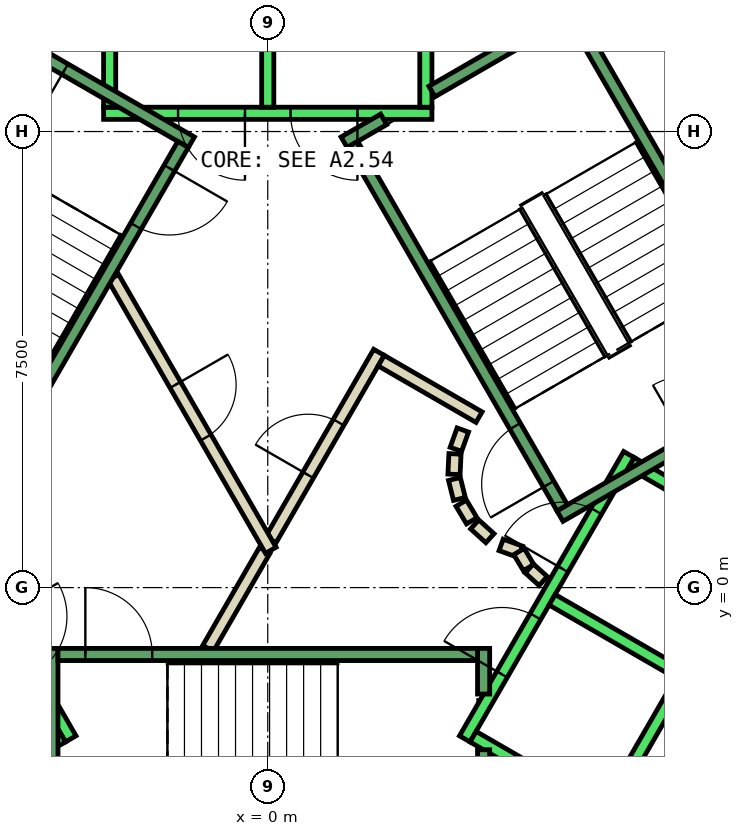
"""IFC4 building model, lengths in metres.
Left out: names, types, materials, properties, quantities, classifications, styles, units other than length and angle.
Written with IfcOpenShell. Run it as: python <this file> out.ifc"""

import sys

from ifc_helpers import new_model, si_unit, direction, frame, frame_2d, origin, place, context, subcontext, project, spatial, polyline, rectangle, outline, extrude, element, fill, save


model = new_model("IFC4")
c1 = context("Model", 3, precision=1e-05, world=origin(), true_north=direction((0.0, 1.0)))
c2 = subcontext(c1, "Body", "Model", "MODEL_VIEW")
j1 = project(units=[si_unit("LENGTHUNIT", "METRE"), si_unit("PLANEANGLEUNIT", "RADIAN")], contexts=[c1])
p1 = place(None, origin())
s1 = spatial("IfcSite", under=j1, at=p1, CompositionType="ELEMENT")
p2 = place(p1, origin())
s2 = spatial("IfcBuilding", under=s1, at=p2, CompositionType="ELEMENT")
p3 = place(p2, frame((0.0, 0.0, 259.4)))
s3 = spatial("IfcBuildingStorey", under=s2, at=p3, CompositionType="ELEMENT", Elevation=259.4)
p4 = place(p3, frame((0.0, 0.0, -0.34)))
e1 = element("IfcWall", 1, at=p4, inside=s3, PredefinedType="SHEAR", context=c2, shape_type="SweptSolid", body=[
    extrude(outline(polyline([(6.786, 10.747), (6.266, 10.447), (10.854, 2.5), (11.547, 2.5), (6.786, 10.747)])), origin(), (0.0, 0.0, 1.0), 3.6),
])
p5 = place(p3, frame((0.0, 0.0, -0.34)))
e2 = element("IfcWall", 2, at=p5, inside=s3, PredefinedType="SHEAR", context=c2, shape_type="SweptSolid", body=[
    extrude(outline(polyline([(5.774, -7.5), (11.547, 2.5), (10.854, 2.5), (5.427, -6.9), (5.774, -7.5)])), origin(), (0.0, 0.0, 1.0), 3.6),
])
p6 = place(p3, frame((-0.982, -1.0, 0.0), z_axis=(0.0, 0.0, 1.0), x_axis=(0.50024047865, 0.865886518847, 0.0)))
e3 = element("IfcWall", 3, at=p6, inside=s3, PredefinedType="PARTITIONING", context=c2, shape_type="SweptSolid", body=[
    extrude(rectangle(XDim=1.863, YDim=0.2, at=frame_2d((0.931, 0.0))), origin(), (0.0, 0.0, 1.0), 3.26),
])
p7 = place(p3, frame((0.05, 0.787, 0.0), z_axis=(0.0, 0.0, 1.0), x_axis=(0.499954076797, 0.866051915934, 0.0)))
e4 = element("IfcWall", 4, at=p7, inside=s3, PredefinedType="PARTITIONING", context=c2, shape_type="SweptSolid", body=[
    extrude(rectangle(XDim=3.558, YDim=0.2, at=frame_2d((1.779, 0.0))), origin(), (0.0, 0.0, 1.0), 3.26),
])
p8 = place(p7, frame((1.229, 0.0, 0.0)))
e5 = element("IfcOpeningElement", 5, at=p8, cuts=e4, PredefinedType="OPENING", context=c2, shape_type="SweptSolid", body=[
    extrude(rectangle(XDim=1.0, YDim=2.1, at=frame_2d((0.5, 1.05))), frame((0.0, 0.11, 0.0), z_axis=(0.0, -1.0, 0.0), x_axis=(1.0, 0.0, 0.0)), (0.0, 0.0, 1.0), 0.22),
])
p9 = place(p3, frame((1.866, 3.732, 0.0), z_axis=(0.0, 0.0, 1.0), x_axis=(0.866043361281, -0.499968895414, 0.0)))
e6 = element("IfcWall", 6, at=p9, inside=s3, PredefinedType="PARTITIONING", context=c2, shape_type="SweptSolid", body=[
    extrude(rectangle(XDim=1.858, YDim=0.2, at=frame_2d((0.929, 0.0))), origin(), (0.0, 0.0, 1.0), 3.26),
])
p10 = place(p3, frame((3.208, 2.592, 0.0), z_axis=(0.0, 0.0, 1.0), x_axis=(-0.337388820924, -0.941365382578, 0.0)))
e7 = element("IfcWall", 7, at=p10, inside=s3, PredefinedType="PARTITIONING", context=c2, shape_type="SweptSolid", body=[
    extrude(rectangle(XDim=0.338, YDim=0.2, at=frame_2d((0.169, 0.0))), origin(), (0.0, 0.0, 1.0), 3.26),
])
p11 = place(p3, frame((3.079, 2.199, 0.0), z_axis=(0.0, 0.0, 1.0), x_axis=(-0.047771483479, -0.998858290933, 0.0)))
e8 = element("IfcWall", 8, at=p11, inside=s3, PredefinedType="PARTITIONING", context=c2, shape_type="SweptSolid", body=[
    extrude(rectangle(XDim=0.337, YDim=0.2, at=frame_2d((0.169, 0.0))), origin(), (0.0, 0.0, 1.0), 3.26),
])
p12 = place(p3, frame((3.07, 1.786, 0.0), z_axis=(0.0, 0.0, 1.0), x_axis=(0.242705583207, -0.970099994784, 0.0)))
e9 = element("IfcWall", 9, at=p12, inside=s3, PredefinedType="PARTITIONING", context=c2, shape_type="SweptSolid", body=[
    extrude(rectangle(XDim=0.338, YDim=0.2, at=frame_2d((0.169, 0.0))), origin(), (0.0, 0.0, 1.0), 3.26),
])
for number, where, z_axis, x_axis in (
    (10, (3.182, 1.388, 0.0), (0.0, 0.0, 1.0), (0.512, -0.859, 0.0)),
    (11, (3.404, 1.039, 0.0), (0.0, 0.0, 1.0), (0.74, -0.672, 0.0)),
):
    element("IfcWall", number, at=place(p3, frame(where, z_axis=z_axis, x_axis=x_axis)), inside=s3, PredefinedType="PARTITIONING", context=c2, shape_type="SweptSolid", body=[
        extrude(rectangle(XDim=0.338, YDim=0.2, at=frame_2d((0.169, 0.0))), origin(), (0.0, 0.0, 1.0), 3.26),
    ])
p13 = place(p3, frame((3.838, 0.702, 0.0), z_axis=(0.0, 0.0, 1.0), x_axis=(0.941035081519, -0.338308993895, 0.0)))
e12 = element("IfcWall", 12, at=p13, inside=s3, PredefinedType="PARTITIONING", context=c2, shape_type="SweptSolid", body=[
    extrude(rectangle(XDim=0.337, YDim=0.2, at=frame_2d((0.168, 0.0))), origin(), (0.0, 0.0, 1.0), 3.26),
])
p14 = place(p3, frame((4.132, 0.593, 0.0), z_axis=(0.0, 0.0, 1.0), x_axis=(0.513561617048, -0.858052717201, 0.0)))
e13 = element("IfcWall", 13, at=p14, inside=s3, PredefinedType="PARTITIONING", context=c2, shape_type="SweptSolid", body=[
    extrude(rectangle(XDim=0.308, YDim=0.2, at=frame_2d((0.154, 0.0))), origin(), (0.0, 0.0, 1.0), 3.26),
])
p15 = place(p3, frame((4.301, 0.315, 0.0), z_axis=(0.0, 0.0, 1.0), x_axis=(0.741798017506, -0.670623367639, 0.0)))
e14 = element("IfcWall", 14, at=p15, inside=s3, PredefinedType="PARTITIONING", context=c2, shape_type="SweptSolid", body=[
    extrude(rectangle(XDim=0.309, YDim=0.2, at=frame_2d((0.154, 0.0))), origin(), (0.0, 0.0, 1.0), 3.26),
])
p16 = place(p3, frame((-2.54, 5.1, 0.0), z_axis=(0.0, 0.0, 1.0), x_axis=(0.499925051871, -0.866068670783, 0.0)))
e15 = element("IfcWall", 15, at=p16, inside=s3, PredefinedType="PARTITIONING", context=c2, shape_type="SweptSolid", body=[
    extrude(rectangle(XDim=5.181, YDim=0.2, at=frame_2d((2.59, 0.0))), origin(), (0.0, 0.0, 1.0), 3.26),
])
p17 = place(p16, frame((2.04, 0.0, 0.0)))
e16 = element("IfcOpeningElement", 16, at=p17, cuts=e15, PredefinedType="OPENING", context=c2, shape_type="SweptSolid", body=[
    extrude(rectangle(XDim=1.0, YDim=2.1, at=frame_2d((0.5, 1.05))), frame((0.0, 0.11, 0.0), z_axis=(0.0, -1.0, 0.0), x_axis=(1.0, 0.0, 0.0)), (0.0, 0.0, 1.0), 0.22),
])
p18 = place(p3, frame((2.7, 7.8, 0.0), z_axis=(0.0, 0.0, 1.0), x_axis=(-1.0, 0.0, 0.0)))
e17 = element("IfcWall", 17, at=p18, inside=s3, PredefinedType="STANDARD", context=c2, shape_type="SweptSolid", body=[
    extrude(rectangle(XDim=5.4, YDim=0.2, at=frame_2d((2.7, 0.0))), origin(), (0.0, 0.0, 1.0), 3.26),
])
p19 = place(p18, frame((1.225, 0.0, 0.0)))
e18 = element("IfcOpeningElement", 18, at=p19, cuts=e17, PredefinedType="OPENING", context=c2, shape_type="SweptSolid", body=[
    extrude(rectangle(XDim=1.1, YDim=2.1, at=frame_2d((0.55, 1.05))), frame((0.0, 0.11, 0.0), z_axis=(0.0, -1.0, 0.0), x_axis=(1.0, 0.0, 0.0)), (0.0, 0.0, 1.0), 0.22),
])
p20 = place(p18, frame((3.075, 0.0, 0.0)))
e19 = element("IfcOpeningElement", 19, at=p20, cuts=e17, PredefinedType="OPENING", context=c2, shape_type="SweptSolid", body=[
    extrude(rectangle(XDim=1.1, YDim=2.1, at=frame_2d((0.55, 1.05))), frame((0.0, 0.11, 0.0), z_axis=(0.0, -1.0, 0.0), x_axis=(1.0, 0.0, 0.0)), (0.0, 0.0, 1.0), 0.22),
])
for number, where, z_axis, x_axis in (
    (20, (2.6, 7.9, 0.0), (0.0, 0.0, 1.0), (0.0, 1.0, 0.0)),
    (21, (0.0, 7.9, 0.0), (0.0, 0.0, 1.0), (0.0, 1.0, 0.0)),
    (22, (-2.6, 7.9, 0.0), (0.0, 0.0, 1.0), (0.0, 1.0, 0.0)),
):
    element("IfcWall", number, at=place(p3, frame(where, z_axis=z_axis, x_axis=x_axis)), inside=s3, PredefinedType="STANDARD", context=c2, shape_type="SweptSolid", body=[
        extrude(rectangle(XDim=2.4, YDim=0.2, at=frame_2d((1.2, 0.0))), origin(), (0.0, 0.0, 1.0), 3.26),
    ])
p21 = place(p3, frame((-5.94, 2.188, 0.0), z_axis=(0.0, 0.0, 1.0), x_axis=(0.500034260056, -0.866005622828, 0.0)))
e23 = element("IfcWall", 23, at=p21, inside=s3, PredefinedType="STANDARD", context=c2, shape_type="SweptSolid", body=[
    extrude(rectangle(XDim=5.399, YDim=0.2, at=frame_2d((2.7, 0.0))), origin(), (0.0, 0.0, 1.0), 3.26),
])
p22 = place(p21, frame((3.075, 0.0, 0.0)))
e24 = element("IfcOpeningElement", 24, at=p22, cuts=e23, PredefinedType="OPENING", context=c2, shape_type="SweptSolid", body=[
    extrude(rectangle(XDim=1.1, YDim=2.1, at=frame_2d((0.55, 1.05))), frame((0.0, 0.11, 0.0), z_axis=(0.0, -1.0, 0.0), x_axis=(1.0, 0.0, 0.0)), (0.0, 0.0, 1.0), 0.22),
])
p23 = place(p21, frame((1.225, 0.0, 0.0)))
e25 = element("IfcOpeningElement", 25, at=p23, cuts=e23, PredefinedType="OPENING", context=c2, shape_type="SweptSolid", body=[
    extrude(rectangle(XDim=1.1, YDim=2.1, at=frame_2d((0.55, 1.05))), frame((0.0, 0.11, 0.0), z_axis=(0.0, -1.0, 0.0), x_axis=(1.0, 0.0, 0.0)), (0.0, 0.0, 1.0), 0.22),
])
p24 = place(p3, frame((-3.377, -2.452, 0.0), z_axis=(0.0, 0.0, 1.0), x_axis=(-0.865955154139, -0.50012165622, 0.0)))
e26 = element("IfcWall", 26, at=p24, inside=s3, PredefinedType="STANDARD", context=c2, shape_type="SweptSolid", body=[
    extrude(rectangle(XDim=2.4, YDim=0.2, at=frame_2d((1.2, 0.0))), origin(), (0.0, 0.0, 1.0), 3.26),
])
p25 = place(p3, frame((3.24, -2.488, 0.0), z_axis=(0.0, 0.0, 1.0), x_axis=(0.500034260056, 0.866005622828, 0.0)))
e27 = element("IfcWall", 27, at=p25, inside=s3, PredefinedType="STANDARD", context=c2, shape_type="SweptSolid", body=[
    extrude(rectangle(XDim=5.399, YDim=0.2, at=frame_2d((2.7, 0.0))), origin(), (0.0, 0.0, 1.0), 3.26),
])
p26 = place(p25, frame((3.225, 0.0, 0.0)))
e28 = element("IfcOpeningElement", 28, at=p26, cuts=e27, PredefinedType="OPENING", context=c2, shape_type="SweptSolid", body=[
    extrude(rectangle(XDim=1.1, YDim=2.1, at=frame_2d((0.55, 1.05))), frame((0.0, 0.11, 0.0), z_axis=(0.0, -1.0, 0.0), x_axis=(1.0, 0.0, 0.0)), (0.0, 0.0, 1.0), 0.22),
])
p27 = place(p25, frame((1.225, 0.0, 0.0)))
e29 = element("IfcOpeningElement", 29, at=p27, cuts=e27, PredefinedType="OPENING", context=c2, shape_type="SweptSolid", body=[
    extrude(rectangle(XDim=1.1, YDim=2.1, at=frame_2d((0.55, 1.05))), frame((0.0, 0.11, 0.0), z_axis=(0.0, -1.0, 0.0), x_axis=(1.0, 0.0, 0.0)), (0.0, 0.0, 1.0), 0.22),
])
p28 = place(p3, frame((5.492, -3.788, 0.0), z_axis=(0.0, 0.0, 1.0), x_axis=(0.500034260056, 0.866005622828, 0.0)))
e30 = element("IfcWall", 30, at=p28, inside=s3, PredefinedType="STANDARD", context=c2, shape_type="SweptSolid", body=[
    extrude(rectangle(XDim=5.399, YDim=0.2, at=frame_2d((2.7, 0.0))), origin(), (0.0, 0.0, 1.0), 3.26),
])
p29 = place(p3, frame((3.377, -2.452, 0.0), z_axis=(0.0, 0.0, 1.0), x_axis=(0.865955154139, -0.50012165622, 0.0)))
e31 = element("IfcWall", 31, at=p29, inside=s3, PredefinedType="STANDARD", context=c2, shape_type="SweptSolid", body=[
    extrude(rectangle(XDim=2.4, YDim=0.2, at=frame_2d((1.2, 0.0))), origin(), (0.0, 0.0, 1.0), 3.26),
])
for number, where, z_axis, x_axis in (
    (32, (4.677, -0.2, 0.0), (0.0, 0.0, 1.0), (0.866, -0.5, 0.0)),
    (33, (5.977, 2.052, 0.0), (0.0, 0.0, 1.0), (0.866, -0.5, 0.0)),
):
    element("IfcWall", number, at=place(p3, frame(where, z_axis=z_axis, x_axis=x_axis)), inside=s3, PredefinedType="STANDARD", context=c2, shape_type="SweptSolid", body=[
        extrude(rectangle(XDim=2.399, YDim=0.2, at=frame_2d((1.2, 0.0))), origin(), (0.0, 0.0, 1.0), 3.26),
    ])
p30 = place(p3, frame((-3.55, -1.0, 0.0), z_axis=(0.0, 0.0, 1.0), x_axis=(0.0, -1.0, 0.0)))
e34 = element("IfcWall", 34, at=p30, inside=s3, PredefinedType="STANDARD", context=c2, shape_type="SweptSolid", body=[
    extrude(rectangle(XDim=4.4, YDim=0.2, at=frame_2d((2.2, 0.0))), origin(), (0.0, 0.0, 1.0), 3.26),
])
p31 = place(p30, frame((2.4, 0.0, 0.0)))
e35 = element("IfcOpeningElement", 35, at=p31, cuts=e34, PredefinedType="OPENING", context=c2, shape_type="SweptSolid", body=[
    extrude(rectangle(XDim=1.1, YDim=2.2, at=frame_2d((0.55, 1.1))), frame((0.0, 0.11, 0.0), z_axis=(0.0, -1.0, 0.0), x_axis=(1.0, 0.0, 0.0)), (0.0, 0.0, 1.0), 0.22),
])
p32 = place(p3, frame((3.55, -2.667, 0.0), z_axis=(0.0, 0.0, 1.0), x_axis=(0.0, -1.0, 0.0)))
e36 = element("IfcWall", 36, at=p32, inside=s3, PredefinedType="STANDARD", context=c2, shape_type="SweptSolid", body=[
    extrude(rectangle(XDim=2.733, YDim=0.2, at=frame_2d((1.366, 0.0))), origin(), (0.0, 0.0, 1.0), 3.26),
])
p33 = place(p3, frame((3.55, -1.0, 0.0), z_axis=(0.0, 0.0, 1.0), x_axis=(0.0, -1.0, 0.0)))
e37 = element("IfcWall", 37, at=p33, inside=s3, PredefinedType="STANDARD", context=c2, shape_type="SweptSolid", body=[
    extrude(rectangle(XDim=0.751, YDim=0.2, at=frame_2d((0.375, 0.0))), origin(), (0.0, 0.0, 1.0), 3.26),
])
p34 = place(p3, frame((-3.45, -1.1, 0.0), z_axis=(0.0, 0.0, 1.0), x_axis=(1.0, 0.0, 0.0)))
e38 = element("IfcWall", 38, at=p34, inside=s3, PredefinedType="STANDARD", context=c2, shape_type="SweptSolid", body=[
    extrude(rectangle(XDim=6.9, YDim=0.2, at=frame_2d((3.45, 0.0))), origin(), (0.0, 0.0, 1.0), 3.26),
])
p35 = place(p34, frame((0.45, 0.0, 0.0)))
e39 = element("IfcOpeningElement", 39, at=p35, cuts=e38, PredefinedType="OPENING", context=c2, shape_type="SweptSolid", body=[
    extrude(rectangle(XDim=1.1, YDim=2.2, at=frame_2d((0.55, 1.1))), frame((0.0, 0.11, 0.0), z_axis=(0.0, -1.0, 0.0), x_axis=(1.0, 0.0, 0.0)), (0.0, 0.0, 1.0), 0.22),
])
p36 = place(p3, frame((4.806, 1.176, 0.0), z_axis=(0.0, 0.0, 1.0), x_axis=(0.866059941101, 0.499940174841, 0.0)))
e40 = element("IfcWall", 40, at=p36, inside=s3, PredefinedType="STANDARD", context=c2, shape_type="SweptSolid", body=[
    extrude(rectangle(XDim=4.4, YDim=0.2, at=frame_2d((2.2, 0.0))), origin(), (0.0, 0.0, 1.0), 3.26),
])
p37 = place(p36, frame((2.4, 0.0, 0.0)))
e41 = element("IfcOpeningElement", 41, at=p37, cuts=e40, PredefinedType="OPENING", context=c2, shape_type="SweptSolid", body=[
    extrude(rectangle(XDim=1.1, YDim=2.2, at=frame_2d((0.55, 1.1))), frame((0.0, 0.11, 0.0), z_axis=(0.0, -1.0, 0.0), x_axis=(1.0, 0.0, 0.0)), (0.0, 0.0, 1.0), 0.22),
])
p38 = place(p3, frame((2.7, 8.158, 0.0), z_axis=(0.0, 0.0, 1.0), x_axis=(0.86611865017, 0.499838457731, 0.0)))
e42 = element("IfcWall", 42, at=p38, inside=s3, PredefinedType="STANDARD", context=c2, shape_type="SweptSolid", body=[
    extrude(rectangle(XDim=2.733, YDim=0.2, at=frame_2d((1.366, 0.0))), origin(), (0.0, 0.0, 1.0), 3.26),
])
p39 = place(p3, frame((1.256, 7.324, 0.0), z_axis=(0.0, 0.0, 1.0), x_axis=(0.865915093549, 0.500191014278, 0.0)))
e43 = element("IfcWall", 43, at=p39, inside=s3, PredefinedType="STANDARD", context=c2, shape_type="SweptSolid", body=[
    extrude(rectangle(XDim=0.752, YDim=0.2, at=frame_2d((0.376, 0.0))), origin(), (0.0, 0.0, 1.0), 3.26),
])
p40 = place(p3, frame((4.843, 1.312, 0.0), z_axis=(0.0, 0.0, 1.0), x_axis=(-0.499963383562, 0.866046543262, 0.0)))
e44 = element("IfcWall", 44, at=p40, inside=s3, PredefinedType="STANDARD", context=c2, shape_type="SweptSolid", body=[
    extrude(rectangle(XDim=6.9, YDim=0.2, at=frame_2d((3.45, 0.0))), origin(), (0.0, 0.0, 1.0), 3.26),
])
p41 = place(p40, frame((0.45, 0.0, 0.0)))
e45 = element("IfcOpeningElement", 45, at=p41, cuts=e44, PredefinedType="OPENING", context=c2, shape_type="SweptSolid", body=[
    extrude(rectangle(XDim=1.1, YDim=2.2, at=frame_2d((0.55, 1.1))), frame((0.0, 0.11, 0.0), z_axis=(0.0, -1.0, 0.0), x_axis=(1.0, 0.0, 0.0)), (0.0, 0.0, 1.0), 0.22),
])
p42 = place(p3, frame((8.48, 3.412, 0.0), z_axis=(0.0, 0.0, 1.0), x_axis=(-0.499978703459, 0.866037698999, 0.0)))
e46 = element("IfcWall", 46, at=p42, inside=s3, PredefinedType="STANDARD", context=c2, shape_type="SweptSolid", body=[
    extrude(rectangle(XDim=6.9, YDim=0.2, at=frame_2d((3.45, 0.0))), origin(), (0.0, 0.0, 1.0), 3.26),
])
p43 = place(p3, frame((-1.256, 7.324, 0.0), z_axis=(0.0, 0.0, 1.0), x_axis=(-0.866046073146, 0.499964197906, 0.0)))
e47 = element("IfcWall", 47, at=p43, inside=s3, PredefinedType="STANDARD", context=c2, shape_type="SweptSolid", body=[
    extrude(rectangle(XDim=4.4, YDim=0.2, at=frame_2d((2.2, 0.0))), origin(), (0.0, 0.0, 1.0), 3.26),
])
p44 = place(p43, frame((2.4, 0.0, 0.0)))
e48 = element("IfcOpeningElement", 48, at=p44, cuts=e47, PredefinedType="OPENING", context=c2, shape_type="SweptSolid", body=[
    extrude(rectangle(XDim=1.1, YDim=2.2, at=frame_2d((0.55, 1.1))), frame((0.0, 0.11, 0.0), z_axis=(0.0, -1.0, 0.0), x_axis=(1.0, 0.0, 0.0)), (0.0, 0.0, 1.0), 0.22),
])
p45 = place(p3, frame((-1.393, 7.288, 0.0), z_axis=(0.0, 0.0, 1.0), x_axis=(-0.499963383562, -0.866046543262, 0.0)))
e49 = element("IfcWall", 49, at=p45, inside=s3, PredefinedType="STANDARD", context=c2, shape_type="SweptSolid", body=[
    extrude(rectangle(XDim=6.9, YDim=0.2, at=frame_2d((3.45, 0.0))), origin(), (0.0, 0.0, 1.0), 3.26),
])
p46 = place(p45, frame((0.45, 0.0, 0.0)))
e50 = element("IfcOpeningElement", 50, at=p46, cuts=e49, PredefinedType="OPENING", context=c2, shape_type="SweptSolid", body=[
    extrude(rectangle(XDim=1.1, YDim=2.2, at=frame_2d((0.55, 1.1))), frame((0.0, 0.11, 0.0), z_axis=(0.0, -1.0, 0.0), x_axis=(1.0, 0.0, 0.0)), (0.0, 0.0, 1.0), 0.22),
])
p47 = place(p8, origin())
e51 = element("IfcDoor", 51, at=p47, inside=s3, OperationType="SINGLE_SWING_RIGHT", PredefinedType="DOOR", context=c2, shape_type="SweptSolid", body=[
    extrude(rectangle(XDim=1.0, YDim=2.1, at=frame_2d((0.5, 1.05))), frame((0.0, 0.025, 0.0), z_axis=(0.0, -1.0, 0.0), x_axis=(1.0, 0.0, 0.0)), (0.0, 0.0, 1.0), 0.05),
])
fill(e5, e51)
p48 = place(p17, origin())
e52 = element("IfcDoor", 52, at=p48, inside=s3, OperationType="SINGLE_SWING_RIGHT", PredefinedType="DOOR", context=c2, shape_type="SweptSolid", body=[
    extrude(rectangle(XDim=1.0, YDim=2.1, at=frame_2d((0.5, 1.05))), frame((0.0, 0.025, 0.0), z_axis=(0.0, -1.0, 0.0), x_axis=(1.0, 0.0, 0.0)), (0.0, 0.0, 1.0), 0.05),
])
fill(e16, e52)
p49 = place(p19, origin())
e53 = element("IfcDoor", 53, at=p49, inside=s3, OperationType="SLIDING_TO_LEFT", PredefinedType="DOOR", context=c2, shape_type="SweptSolid", body=[
    extrude(rectangle(XDim=1.1, YDim=2.1, at=frame_2d((0.55, 1.05))), frame((0.0, 0.025, 0.0), z_axis=(0.0, -1.0, 0.0), x_axis=(1.0, 0.0, 0.0)), (0.0, 0.0, 1.0), 0.05),
])
fill(e18, e53)
p50 = place(p20, origin())
e54 = element("IfcDoor", 54, at=p50, inside=s3, OperationType="SLIDING_TO_LEFT", PredefinedType="DOOR", context=c2, shape_type="SweptSolid", body=[
    extrude(rectangle(XDim=1.1, YDim=2.1, at=frame_2d((0.55, 1.05))), frame((0.0, 0.025, 0.0), z_axis=(0.0, -1.0, 0.0), x_axis=(1.0, 0.0, 0.0)), (0.0, 0.0, 1.0), 0.05),
])
fill(e19, e54)
p51 = place(p26, origin())
e55 = element("IfcDoor", 55, at=p51, inside=s3, OperationType="SLIDING_TO_LEFT", PredefinedType="DOOR", context=c2, shape_type="SweptSolid", body=[
    extrude(rectangle(XDim=1.1, YDim=2.1, at=frame_2d((0.55, 1.05))), frame((0.0, 0.025, 0.0), z_axis=(0.0, -1.0, 0.0), x_axis=(1.0, 0.0, 0.0)), (0.0, 0.0, 1.0), 0.05),
])
fill(e28, e55)
p52 = place(p27, origin())
e56 = element("IfcDoor", 56, at=p52, inside=s3, OperationType="SLIDING_TO_LEFT", PredefinedType="DOOR", context=c2, shape_type="SweptSolid", body=[
    extrude(rectangle(XDim=1.1, YDim=2.1, at=frame_2d((0.55, 1.05))), frame((0.0, 0.025, 0.0), z_axis=(0.0, -1.0, 0.0), x_axis=(1.0, 0.0, 0.0)), (0.0, 0.0, 1.0), 0.05),
])
fill(e29, e56)
p53 = place(p35, origin())
e57 = element("IfcDoor", 57, at=p53, inside=s3, OperationType="SINGLE_SWING_LEFT", PredefinedType="DOOR", context=c2, shape_type="SweptSolid", body=[
    extrude(rectangle(XDim=1.1, YDim=2.2, at=frame_2d((0.55, 1.1))), frame((0.0, 0.025, 0.0), z_axis=(0.0, -1.0, 0.0), x_axis=(1.0, 0.0, 0.0)), (0.0, 0.0, 1.0), 0.05),
])
fill(e39, e57)
p54 = place(p41, origin())
e58 = element("IfcDoor", 58, at=p54, inside=s3, OperationType="SINGLE_SWING_LEFT", PredefinedType="DOOR", context=c2, shape_type="SweptSolid", body=[
    extrude(rectangle(XDim=1.1, YDim=2.2, at=frame_2d((0.55, 1.1))), frame((0.0, 0.025, 0.0), z_axis=(0.0, -1.0, 0.0), x_axis=(1.0, 0.0, 0.0)), (0.0, 0.0, 1.0), 0.05),
])
fill(e45, e58)
p55 = place(p46, origin())
e59 = element("IfcDoor", 59, at=p55, inside=s3, OperationType="SINGLE_SWING_LEFT", PredefinedType="DOOR", context=c2, shape_type="SweptSolid", body=[
    extrude(rectangle(XDim=1.1, YDim=2.2, at=frame_2d((0.55, 1.1))), frame((0.0, 0.025, 0.0), z_axis=(0.0, -1.0, 0.0), x_axis=(1.0, 0.0, 0.0)), (0.0, 0.0, 1.0), 0.05),
])
fill(e50, e59)
p56 = place(p44, origin())
e60 = element("IfcDoor", 60, at=p56, inside=s3, OperationType="SINGLE_SWING_LEFT", PredefinedType="DOOR", context=c2, shape_type="SweptSolid", body=[
    extrude(rectangle(XDim=1.1, YDim=2.2, at=frame_2d((0.55, 1.1))), frame((0.0, 0.025, 0.0), z_axis=(0.0, -1.0, 0.0), x_axis=(1.0, 0.0, 0.0)), (0.0, 0.0, 1.0), 0.05),
])
fill(e48, e60)
save(model, sys.argv[1])
